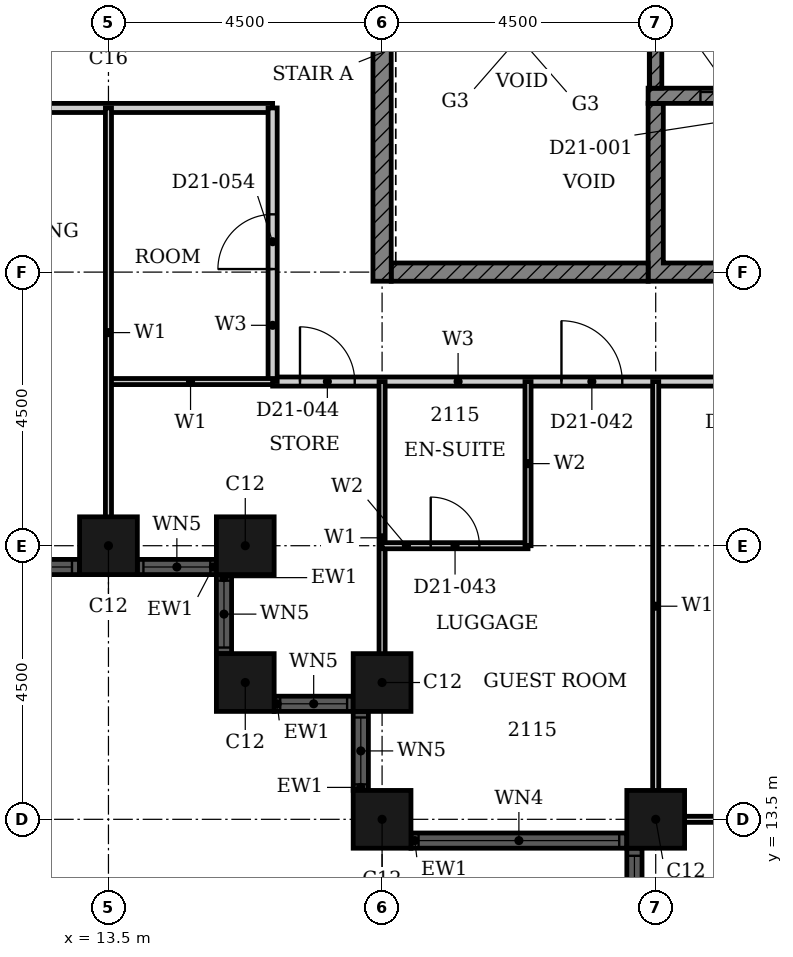
"""IFC4 building model, lengths in metres.
Left out: names, types, materials, properties, quantities, classifications, styles, units other than length and angle.
Written with IfcOpenShell. Run it as: python <this file> out.ifc"""

import sys

from ifc_helpers import new_model, si_unit, direction, frame, frame_2d, origin, origin_2d, place, context, subcontext, project, spatial, polyline, rectangle, hollow_rectangle, outline, extrude, element, fill, save


model = new_model("IFC4")
c1 = context("Model", 3, precision=1e-05, world=origin(), true_north=direction((0.0, 1.0)))
c2 = subcontext(c1, "Body", "Model", "MODEL_VIEW")
j1 = project(units=[si_unit("LENGTHUNIT", "METRE"), si_unit("PLANEANGLEUNIT", "RADIAN")], contexts=[c1])
p1 = place(None, origin())
s1 = spatial("IfcSite", under=j1, at=p1, CompositionType="ELEMENT")
p2 = place(p1, origin())
s2 = spatial("IfcBuilding", under=s1, at=p2, CompositionType="ELEMENT")
p3 = place(p2, frame((0.0, 0.0, 88.8)))
s3 = spatial("IfcBuildingStorey", under=s2, at=p3, CompositionType="ELEMENT", Elevation=88.8)
for number, where, z_axis, x_axis in (
    (1, (13.5, 18.0, 0.0), (0.0, 0.0, 1.0), (1.0, 0.0, 0.0)),
    (2, (15.75, 18.0, 0.0), (0.0, 0.0, 1.0), (1.0, 0.0, 0.0)),
    (3, (15.75, 15.75, 0.0), (0.0, 0.0, 1.0), (1.0, 0.0, 0.0)),
    (4, (18.0, 15.75, 0.0), (0.0, 0.0, 1.0), (1.0, 0.0, 0.0)),
    (5, (18.0, 13.5, 0.0), (0.0, 0.0, 1.0), (1.0, 0.0, 0.0)),
    (6, (22.5, 13.5, 0.0), (0.0, 0.0, 1.0), (1.0, 0.0, 0.0)),
):
    element("IfcColumn", number, at=place(p3, frame(where, z_axis=z_axis, x_axis=x_axis)), inside=s3, PredefinedType="COLUMN", context=c2, shape_type="SweptSolid", body=[
        extrude(hollow_rectangle(XDim=0.95, YDim=0.95, WallThickness=0.03, at=origin_2d()), origin(), (0.0, 0.0, 1.0), 3.6),
    ])
p4 = place(p3, frame((4.975, 17.65, 0.0), z_axis=(0.0, 0.0, 1.0), x_axis=(1.0, 0.0, 0.0)))
e7 = element("IfcWall", 7, at=p4, inside=s3, PredefinedType="SOLIDWALL", context=c2, shape_type="SweptSolid", body=[
    extrude(rectangle(XDim=8.05, YDim=0.25, at=frame_2d((4.025, 0.0))), origin(), (0.0, 0.0, 1.0), 3.6),
])
p5 = place(p4, frame((0.125, 0.0, 0.9)))
e8 = element("IfcOpeningElement", 8, at=p5, cuts=e7, PredefinedType="OPENING", context=c2, shape_type="SweptSolid", body=[
    extrude(rectangle(XDim=3.3, YDim=2.08, at=frame_2d((1.65, 1.04))), frame((0.0, 0.135, 0.0), z_axis=(0.0, -1.0, 0.0), x_axis=(1.0, 0.0, 0.0)), (0.0, 0.0, 1.0), 0.27),
])
p6 = place(p4, frame((4.625, 0.0, 0.9)))
e9 = element("IfcOpeningElement", 9, at=p6, cuts=e7, PredefinedType="OPENING", context=c2, shape_type="SweptSolid", body=[
    extrude(rectangle(XDim=3.3, YDim=2.08, at=frame_2d((1.65, 1.04))), frame((0.0, 0.135, 0.0), z_axis=(0.0, -1.0, 0.0), x_axis=(1.0, 0.0, 0.0)), (0.0, 0.0, 1.0), 0.27),
])
p7 = place(p3, frame((13.975, 17.65, 0.0), z_axis=(0.0, 0.0, 1.0), x_axis=(1.0, 0.0, 0.0)))
e10 = element("IfcWall", 10, at=p7, inside=s3, PredefinedType="SOLIDWALL", context=c2, shape_type="SweptSolid", body=[
    extrude(rectangle(XDim=1.3, YDim=0.25, at=frame_2d((0.65, 0.0))), origin(), (0.0, 0.0, 1.0), 3.6),
])
p8 = place(p7, frame((0.1, 0.0, 0.9)))
e11 = element("IfcOpeningElement", 11, at=p8, cuts=e10, PredefinedType="OPENING", context=c2, shape_type="SweptSolid", body=[
    extrude(rectangle(XDim=1.1, YDim=2.08, at=frame_2d((0.55, 1.04))), frame((0.0, 0.135, 0.0), z_axis=(0.0, -1.0, 0.0), x_axis=(1.0, 0.0, 0.0)), (0.0, 0.0, 1.0), 0.27),
])
p9 = place(p3, frame((15.4, 17.525, 0.0), z_axis=(0.0, 0.0, 1.0), x_axis=(0.0, -1.0, 0.0)))
e12 = element("IfcWall", 12, at=p9, inside=s3, PredefinedType="SOLIDWALL", context=c2, shape_type="SweptSolid", body=[
    extrude(rectangle(XDim=1.3, YDim=0.25, at=frame_2d((0.65, 0.0))), origin(), (0.0, 0.0, 1.0), 3.6),
])
p10 = place(p9, frame((0.1, 0.0, 0.9)))
e13 = element("IfcOpeningElement", 13, at=p10, cuts=e12, PredefinedType="OPENING", context=c2, shape_type="SweptSolid", body=[
    extrude(rectangle(XDim=1.1, YDim=2.08, at=frame_2d((0.55, 1.04))), frame((0.0, 0.135, 0.0), z_axis=(0.0, -1.0, 0.0), x_axis=(1.0, 0.0, 0.0)), (0.0, 0.0, 1.0), 0.27),
])
p11 = place(p3, frame((16.225, 15.4, 0.0), z_axis=(0.0, 0.0, 1.0), x_axis=(1.0, 0.0, 0.0)))
e14 = element("IfcWall", 14, at=p11, inside=s3, PredefinedType="SOLIDWALL", context=c2, shape_type="SweptSolid", body=[
    extrude(rectangle(XDim=1.3, YDim=0.25, at=frame_2d((0.65, 0.0))), origin(), (0.0, 0.0, 1.0), 3.6),
])
p12 = place(p11, frame((0.1, 0.0, 0.9)))
e15 = element("IfcOpeningElement", 15, at=p12, cuts=e14, PredefinedType="OPENING", context=c2, shape_type="SweptSolid", body=[
    extrude(rectangle(XDim=1.1, YDim=2.08, at=frame_2d((0.55, 1.04))), frame((0.0, 0.135, 0.0), z_axis=(0.0, -1.0, 0.0), x_axis=(1.0, 0.0, 0.0)), (0.0, 0.0, 1.0), 0.27),
])
p13 = place(p3, frame((17.65, 15.275, 0.0), z_axis=(0.0, 0.0, 1.0), x_axis=(0.0, -1.0, 0.0)))
e16 = element("IfcWall", 16, at=p13, inside=s3, PredefinedType="SOLIDWALL", context=c2, shape_type="SweptSolid", body=[
    extrude(rectangle(XDim=1.3, YDim=0.25, at=frame_2d((0.65, 0.0))), origin(), (0.0, 0.0, 1.0), 3.6),
])
p14 = place(p13, frame((0.1, 0.0, 0.9)))
e17 = element("IfcOpeningElement", 17, at=p14, cuts=e16, PredefinedType="OPENING", context=c2, shape_type="SweptSolid", body=[
    extrude(rectangle(XDim=1.1, YDim=2.08, at=frame_2d((0.55, 1.04))), frame((0.0, 0.135, 0.0), z_axis=(0.0, -1.0, 0.0), x_axis=(1.0, 0.0, 0.0)), (0.0, 0.0, 1.0), 0.27),
])
p15 = place(p3, frame((18.475, 13.15, 0.0), z_axis=(0.0, 0.0, 1.0), x_axis=(1.0, 0.0, 0.0)))
e18 = element("IfcWall", 18, at=p15, inside=s3, PredefinedType="SOLIDWALL", context=c2, shape_type="SweptSolid", body=[
    extrude(rectangle(XDim=3.55, YDim=0.25, at=frame_2d((1.775, 0.0))), origin(), (0.0, 0.0, 1.0), 3.6),
])
p16 = place(p15, frame((0.125, 0.0, 0.9)))
e19 = element("IfcOpeningElement", 19, at=p16, cuts=e18, PredefinedType="OPENING", context=c2, shape_type="SweptSolid", body=[
    extrude(rectangle(XDim=3.3, YDim=2.08, at=frame_2d((1.65, 1.04))), frame((0.0, 0.135, 0.0), z_axis=(0.0, -1.0, 0.0), x_axis=(1.0, 0.0, 0.0)), (0.0, 0.0, 1.0), 0.27),
])
p17 = place(p3, frame((22.15, 13.025, 0.0), z_axis=(0.0, 0.0, 1.0), x_axis=(0.0, -1.0, 0.0)))
e20 = element("IfcWall", 20, at=p17, inside=s3, PredefinedType="SOLIDWALL", context=c2, shape_type="SweptSolid", body=[
    extrude(rectangle(XDim=8.05, YDim=0.25, at=frame_2d((4.025, 0.0))), origin(), (0.0, 0.0, 1.0), 3.6),
])
p18 = place(p17, frame((0.125, 0.0, 0.9)))
e21 = element("IfcOpeningElement", 21, at=p18, cuts=e20, PredefinedType="OPENING", context=c2, shape_type="SweptSolid", body=[
    extrude(rectangle(XDim=3.3, YDim=2.08, at=frame_2d((1.65, 1.04))), frame((0.0, 0.135, 0.0), z_axis=(0.0, -1.0, 0.0), x_axis=(1.0, 0.0, 0.0)), (0.0, 0.0, 1.0), 0.27),
])
p19 = place(p17, frame((4.625, 0.0, 0.9)))
e22 = element("IfcOpeningElement", 22, at=p19, cuts=e20, PredefinedType="OPENING", context=c2, shape_type="SweptSolid", body=[
    extrude(rectangle(XDim=3.3, YDim=2.08, at=frame_2d((1.65, 1.04))), frame((0.0, 0.135, 0.0), z_axis=(0.0, -1.0, 0.0), x_axis=(1.0, 0.0, 0.0)), (0.0, 0.0, 1.0), 0.27),
])
p20 = place(p3, origin())
e23 = element("IfcWall", 23, at=p20, inside=s3, PredefinedType="SHEAR", context=c2, shape_type="SweptSolid", body=[
    extrude(outline(polyline([(22.375, 22.35), (38.053, 22.35), (38.053, 25.275), (37.803, 25.275), (37.803, 22.65), (35.482, 22.65), (35.482, 25.275), (35.232, 25.275), (35.232, 22.65), (32.911, 22.65), (32.911, 25.275), (32.661, 25.275), (32.661, 22.65), (30.339, 22.65), (30.339, 25.275), (30.089, 25.275), (30.089, 22.65), (27.768, 22.65), (27.768, 25.275), (27.518, 25.275), (27.518, 22.65), (25.197, 22.65), (25.197, 25.275), (24.947, 25.275), (24.947, 22.65), (22.625, 22.65), (22.625, 25.275), (22.375, 25.275), (22.375, 22.35)])), origin(), (0.0, 0.0, 1.0), 3.3),
])
p21 = place(p3, frame((18.15, 22.5, 0.0), z_axis=(0.0, 0.0, 1.0), x_axis=(1.0, 0.0, 0.0)))
e24 = element("IfcWall", 24, at=p21, inside=s3, PredefinedType="SHEAR", context=c2, shape_type="SweptSolid", body=[
    extrude(rectangle(XDim=4.225, YDim=0.3, at=frame_2d((2.113, 0.0))), origin(), (0.0, 0.0, 1.0), 3.3),
])
p22 = place(p3, frame((18.0, 22.35, 0.0), z_axis=(0.0, 0.0, 1.0), x_axis=(0.0, 1.0, 0.0)))
e25 = element("IfcWall", 25, at=p22, inside=s3, PredefinedType="SHEAR", context=c2, shape_type="SweptSolid", body=[
    extrude(rectangle(XDim=9.3, YDim=0.3, at=frame_2d((4.65, 0.0))), origin(), (0.0, 0.0, 1.0), 3.3),
])
p23 = place(p3, frame((22.375, 25.4, 0.0), z_axis=(0.0, 0.0, 1.0), x_axis=(1.0, 0.0, 0.0)))
e26 = element("IfcWall", 26, at=p23, inside=s3, PredefinedType="SHEAR", context=c2, shape_type="SweptSolid", body=[
    extrude(rectangle(XDim=15.678, YDim=0.25, at=frame_2d((7.839, 0.0))), origin(), (0.0, 0.0, 1.0), 3.3),
])
p24 = place(p23, frame((3.432, 0.0, 0.0)))
e27 = element("IfcOpeningElement", 27, at=p24, cuts=e26, PredefinedType="OPENING", context=c2, shape_type="SweptSolid", body=[
    extrude(rectangle(XDim=1.1, YDim=2.1, at=frame_2d((0.55, 1.05))), frame((0.0, 0.135, 0.0), z_axis=(0.0, -1.0, 0.0), x_axis=(1.0, 0.0, 0.0)), (0.0, 0.0, 1.0), 0.27),
])
p25 = place(p23, frame((11.146, 0.0, 0.0)))
e28 = element("IfcOpeningElement", 28, at=p25, cuts=e26, PredefinedType="OPENING", context=c2, shape_type="SweptSolid", body=[
    extrude(rectangle(XDim=1.1, YDim=2.1, at=frame_2d((0.55, 1.05))), frame((0.0, 0.135, 0.0), z_axis=(0.0, -1.0, 0.0), x_axis=(1.0, 0.0, 0.0)), (0.0, 0.0, 1.0), 0.27),
])
p26 = place(p23, frame((13.718, 0.0, 0.0)))
e29 = element("IfcOpeningElement", 29, at=p26, cuts=e26, PredefinedType="OPENING", context=c2, shape_type="SweptSolid", body=[
    extrude(rectangle(XDim=1.1, YDim=2.1, at=frame_2d((0.55, 1.05))), frame((0.0, 0.135, 0.0), z_axis=(0.0, -1.0, 0.0), x_axis=(1.0, 0.0, 0.0)), (0.0, 0.0, 1.0), 0.27),
])
p27 = place(p23, frame((0.861, 0.0, 0.0)))
e30 = element("IfcOpeningElement", 30, at=p27, cuts=e26, PredefinedType="OPENING", context=c2, shape_type="SweptSolid", body=[
    extrude(rectangle(XDim=1.1, YDim=2.1, at=frame_2d((0.55, 1.05))), frame((0.0, 0.135, 0.0), z_axis=(0.0, -1.0, 0.0), x_axis=(1.0, 0.0, 0.0)), (0.0, 0.0, 1.0), 0.27),
])
p28 = place(p3, frame((22.5, 31.35, 0.0), z_axis=(0.0, 0.0, 1.0), x_axis=(0.0, -1.0, 0.0)))
e31 = element("IfcWall", 31, at=p28, inside=s3, PredefinedType="SHEAR", context=c2, shape_type="SweptSolid", body=[
    extrude(rectangle(XDim=5.825, YDim=0.2, at=frame_2d((2.913, 0.0))), origin(), (0.0, 0.0, 1.0), 3.3),
])
p29 = place(p28, frame((0.25, 0.0, 0.0)))
e32 = element("IfcOpeningElement", 32, at=p29, cuts=e31, PredefinedType="OPENING", context=c2, shape_type="SweptSolid", body=[
    extrude(rectangle(XDim=1.8, YDim=2.1, at=frame_2d((0.9, 1.05))), frame((0.0, 0.11, 0.0), z_axis=(0.0, -1.0, 0.0), x_axis=(1.0, 0.0, 0.0)), (0.0, 0.0, 1.0), 0.22),
])
p30 = place(p3, frame((16.2, 20.7, 0.0), z_axis=(0.0, 0.0, 1.0), x_axis=(1.0, 0.0, 0.0)))
e33 = element("IfcWall", 33, at=p30, inside=s3, PredefinedType="PARTITIONING", context=c2, shape_type="SweptSolid", body=[
    extrude(rectangle(XDim=13.5, YDim=0.15, at=frame_2d((6.75, 0.0))), origin(), (0.0, 0.0, 1.0), 3.3),
])
p31 = place(p30, frame((4.75, 0.0, 0.0)))
e34 = element("IfcOpeningElement", 34, at=p31, cuts=e33, PredefinedType="OPENING", context=c2, shape_type="SweptSolid", body=[
    extrude(rectangle(XDim=1.0, YDim=2.1, at=frame_2d((0.5, 1.05))), frame((0.0, 0.085, 0.0), z_axis=(0.0, -1.0, 0.0), x_axis=(1.0, 0.0, 0.0)), (0.0, 0.0, 1.0), 0.17),
])
p32 = place(p30, frame((0.45, 0.0, 0.0)))
e35 = element("IfcOpeningElement", 35, at=p32, cuts=e33, PredefinedType="OPENING", context=c2, shape_type="SweptSolid", body=[
    extrude(rectangle(XDim=0.9, YDim=2.1, at=frame_2d((0.45, 1.05))), frame((0.0, 0.085, 0.0), z_axis=(0.0, -1.0, 0.0), x_axis=(1.0, 0.0, 0.0)), (0.0, 0.0, 1.0), 0.17),
])
p33 = place(p30, frame((7.35, 0.0, 0.0)))
e36 = element("IfcOpeningElement", 36, at=p33, cuts=e33, PredefinedType="OPENING", context=c2, shape_type="SweptSolid", body=[
    extrude(rectangle(XDim=0.9, YDim=2.1, at=frame_2d((0.45, 1.05))), frame((0.0, 0.085, 0.0), z_axis=(0.0, -1.0, 0.0), x_axis=(1.0, 0.0, 0.0)), (0.0, 0.0, 1.0), 0.17),
])
p34 = place(p30, frame((10.95, 0.0, 0.0)))
e37 = element("IfcOpeningElement", 37, at=p34, cuts=e33, PredefinedType="OPENING", context=c2, shape_type="SweptSolid", body=[
    extrude(rectangle(XDim=0.9, YDim=2.1, at=frame_2d((0.45, 1.05))), frame((0.0, 0.085, 0.0), z_axis=(0.0, -1.0, 0.0), x_axis=(1.0, 0.0, 0.0)), (0.0, 0.0, 1.0), 0.17),
])
p35 = place(p3, frame((4.5, 25.2, 0.0), z_axis=(0.0, 0.0, 1.0), x_axis=(1.0, 0.0, 0.0)))
e38 = element("IfcWall", 38, at=p35, inside=s3, PredefinedType="PARTITIONING", context=c2, shape_type="SweptSolid", body=[
    extrude(rectangle(XDim=11.7, YDim=0.15, at=frame_2d((5.85, 0.0))), origin(), (0.0, 0.0, 1.0), 3.3),
])
p36 = place(p35, frame((6.25, 0.0, 0.0)))
e39 = element("IfcOpeningElement", 39, at=p36, cuts=e38, PredefinedType="OPENING", context=c2, shape_type="SweptSolid", body=[
    extrude(rectangle(XDim=1.0, YDim=2.1, at=frame_2d((0.5, 1.05))), frame((0.0, 0.085, 0.0), z_axis=(0.0, -1.0, 0.0), x_axis=(1.0, 0.0, 0.0)), (0.0, 0.0, 1.0), 0.17),
])
p37 = place(p3, frame((16.2, 20.7, 0.0), z_axis=(0.0, 0.0, 1.0), x_axis=(0.0, 1.0, 0.0)))
e40 = element("IfcWall", 40, at=p37, inside=s3, PredefinedType="PARTITIONING", context=c2, shape_type="SweptSolid", body=[
    extrude(rectangle(XDim=4.5, YDim=0.15, at=frame_2d((2.25, 0.0))), origin(), (0.0, 0.0, 1.0), 3.3),
])
p38 = place(p37, frame((1.85, 0.0, 0.0)))
e41 = element("IfcOpeningElement", 41, at=p38, cuts=e40, PredefinedType="OPENING", context=c2, shape_type="SweptSolid", body=[
    extrude(rectangle(XDim=0.9, YDim=2.1, at=frame_2d((0.45, 1.05))), frame((0.0, 0.085, 0.0), z_axis=(0.0, -1.0, 0.0), x_axis=(1.0, 0.0, 0.0)), (0.0, 0.0, 1.0), 0.17),
])
p39 = place(p3, frame((22.31, 13.5, 0.0), z_axis=(0.0, 0.0, 1.0), x_axis=(1.0, 0.0, 0.0)))
e42 = element("IfcWall", 42, at=p39, inside=s3, PredefinedType="PARTITIONING", context=c2, shape_type="SweptSolid", body=[
    extrude(rectangle(XDim=7.39, YDim=0.1, at=frame_2d((3.695, 0.0))), origin(), (0.0, 0.0, 1.0), 2.38),
])
p40 = place(p3, frame((13.5, 20.7, 0.0), z_axis=(0.0, 0.0, 1.0), x_axis=(1.0, 0.0, 0.0)))
e43 = element("IfcWall", 43, at=p40, inside=s3, PredefinedType="PARTITIONING", context=c2, shape_type="SweptSolid", body=[
    extrude(rectangle(XDim=2.7, YDim=0.1, at=frame_2d((1.35, 0.0))), origin(), (0.0, 0.0, 1.0), 3.3),
])
p41 = place(p3, frame((13.5, 17.81, 0.0), z_axis=(0.0, 0.0, 1.0), x_axis=(0.0, 1.0, 0.0)))
e44 = element("IfcWall", 44, at=p41, inside=s3, PredefinedType="PARTITIONING", context=c2, shape_type="SweptSolid", body=[
    extrude(rectangle(XDim=7.39, YDim=0.1, at=frame_2d((3.695, 0.0))), origin(), (0.0, 0.0, 1.0), 2.38),
])
p42 = place(p3, frame((18.0, 15.56, 0.0), z_axis=(0.0, 0.0, 1.0), x_axis=(0.0, 1.0, 0.0)))
e45 = element("IfcWall", 45, at=p42, inside=s3, PredefinedType="PARTITIONING", context=c2, shape_type="SweptSolid", body=[
    extrude(rectangle(XDim=5.14, YDim=0.1, at=frame_2d((2.57, 0.0))), origin(), (0.0, 0.0, 1.0), 3.3),
])
p43 = place(p3, frame((22.5, 13.31, 0.0), z_axis=(0.0, 0.0, 1.0), x_axis=(0.0, 1.0, 0.0)))
e46 = element("IfcWall", 46, at=p43, inside=s3, PredefinedType="PARTITIONING", context=c2, shape_type="SweptSolid", body=[
    extrude(rectangle(XDim=7.39, YDim=0.1, at=frame_2d((3.695, 0.0))), origin(), (0.0, 0.0, 1.0), 3.3),
])
p44 = place(p3, frame((18.0, 18.0, 0.0), z_axis=(0.0, 0.0, 1.0), x_axis=(1.0, 0.0, 0.0)))
e47 = element("IfcWall", 47, at=p44, inside=s3, PredefinedType="PARTITIONING", context=c2, shape_type="SweptSolid", body=[
    extrude(rectangle(XDim=2.4, YDim=0.1, at=frame_2d((1.2, 0.0))), origin(), (0.0, 0.0, 1.0), 3.3),
])
p45 = place(p44, frame((0.8, 0.0, 0.0)))
e48 = element("IfcOpeningElement", 48, at=p45, cuts=e47, PredefinedType="OPENING", context=c2, shape_type="SweptSolid", body=[
    extrude(rectangle(XDim=0.8, YDim=2.1, at=frame_2d((0.4, 1.05))), frame((0.0, 0.06, 0.0), z_axis=(0.0, -1.0, 0.0), x_axis=(1.0, 0.0, 0.0)), (0.0, 0.0, 1.0), 0.12),
])
p46 = place(p3, frame((20.4, 18.0, 0.0), z_axis=(0.0, 0.0, 1.0), x_axis=(0.0, 1.0, 0.0)))
e49 = element("IfcWall", 49, at=p46, inside=s3, PredefinedType="PARTITIONING", context=c2, shape_type="SweptSolid", body=[
    extrude(rectangle(XDim=2.7, YDim=0.1, at=frame_2d((1.35, 0.0))), origin(), (0.0, 0.0, 1.0), 3.3),
])
p47 = place(p6, origin())
e50 = element("IfcWindow", 50, at=p47, inside=s3, PartitioningType="SINGLE_PANEL", PredefinedType="WINDOW", context=c2, shape_type="SweptSolid", body=[
    extrude(rectangle(XDim=3.3, YDim=2.08, at=frame_2d((1.65, 1.04))), frame((0.0, 0.03, 0.0), z_axis=(0.0, -1.0, 0.0), x_axis=(1.0, 0.0, 0.0)), (0.0, 0.0, 1.0), 0.06),
])
fill(e9, e50)
p48 = place(p8, origin())
e51 = element("IfcWindow", 51, at=p48, inside=s3, PartitioningType="SINGLE_PANEL", PredefinedType="WINDOW", context=c2, shape_type="SweptSolid", body=[
    extrude(rectangle(XDim=1.1, YDim=2.08, at=frame_2d((0.55, 1.04))), frame((0.0, 0.03, 0.0), z_axis=(0.0, -1.0, 0.0), x_axis=(1.0, 0.0, 0.0)), (0.0, 0.0, 1.0), 0.06),
])
fill(e11, e51)
p49 = place(p10, origin())
e52 = element("IfcWindow", 52, at=p49, inside=s3, PartitioningType="SINGLE_PANEL", PredefinedType="WINDOW", context=c2, shape_type="SweptSolid", body=[
    extrude(rectangle(XDim=1.1, YDim=2.08, at=frame_2d((0.55, 1.04))), frame((0.0, 0.03, 0.0), z_axis=(0.0, -1.0, 0.0), x_axis=(1.0, 0.0, 0.0)), (0.0, 0.0, 1.0), 0.06),
])
fill(e13, e52)
p50 = place(p12, origin())
e53 = element("IfcWindow", 53, at=p50, inside=s3, PartitioningType="SINGLE_PANEL", PredefinedType="WINDOW", context=c2, shape_type="SweptSolid", body=[
    extrude(rectangle(XDim=1.1, YDim=2.08, at=frame_2d((0.55, 1.04))), frame((0.0, 0.03, 0.0), z_axis=(0.0, -1.0, 0.0), x_axis=(1.0, 0.0, 0.0)), (0.0, 0.0, 1.0), 0.06),
])
fill(e15, e53)
p51 = place(p14, origin())
e54 = element("IfcWindow", 54, at=p51, inside=s3, PartitioningType="SINGLE_PANEL", PredefinedType="WINDOW", context=c2, shape_type="SweptSolid", body=[
    extrude(rectangle(XDim=1.1, YDim=2.08, at=frame_2d((0.55, 1.04))), frame((0.0, 0.03, 0.0), z_axis=(0.0, -1.0, 0.0), x_axis=(1.0, 0.0, 0.0)), (0.0, 0.0, 1.0), 0.06),
])
fill(e17, e54)
p52 = place(p16, origin())
e55 = element("IfcWindow", 55, at=p52, inside=s3, PartitioningType="SINGLE_PANEL", PredefinedType="WINDOW", context=c2, shape_type="SweptSolid", body=[
    extrude(rectangle(XDim=3.3, YDim=2.08, at=frame_2d((1.65, 1.04))), frame((0.0, 0.03, 0.0), z_axis=(0.0, -1.0, 0.0), x_axis=(1.0, 0.0, 0.0)), (0.0, 0.0, 1.0), 0.06),
])
fill(e19, e55)
p53 = place(p18, origin())
e56 = element("IfcWindow", 56, at=p53, inside=s3, PartitioningType="SINGLE_PANEL", PredefinedType="WINDOW", context=c2, shape_type="SweptSolid", body=[
    extrude(rectangle(XDim=3.3, YDim=2.08, at=frame_2d((1.65, 1.04))), frame((0.0, 0.03, 0.0), z_axis=(0.0, -1.0, 0.0), x_axis=(1.0, 0.0, 0.0)), (0.0, 0.0, 1.0), 0.06),
])
fill(e21, e56)
p54 = place(p27, origin())
e57 = element("IfcDoor", 57, at=p54, inside=s3, OperationType="DOUBLE_DOOR_SLIDING", PredefinedType="DOOR", context=c2, shape_type="SweptSolid", body=[
    extrude(rectangle(XDim=1.1, YDim=2.1, at=frame_2d((0.55, 1.05))), frame((0.0, 0.025, 0.0), z_axis=(0.0, -1.0, 0.0), x_axis=(1.0, 0.0, 0.0)), (0.0, 0.0, 1.0), 0.05),
])
fill(e30, e57)
p55 = place(p31, origin())
e58 = element("IfcDoor", 58, at=p55, inside=s3, OperationType="SINGLE_SWING_RIGHT", PredefinedType="DOOR", context=c2, shape_type="SweptSolid", body=[
    extrude(rectangle(XDim=1.0, YDim=2.1, at=frame_2d((0.5, 1.05))), frame((0.0, 0.025, 0.0), z_axis=(0.0, -1.0, 0.0), x_axis=(1.0, 0.0, 0.0)), (0.0, 0.0, 1.0), 0.05),
])
fill(e34, e58)
p56 = place(p45, origin())
e59 = element("IfcDoor", 59, at=p56, inside=s3, OperationType="SINGLE_SWING_RIGHT", PredefinedType="DOOR", context=c2, shape_type="SweptSolid", body=[
    extrude(rectangle(XDim=0.8, YDim=2.1, at=frame_2d((0.4, 1.05))), frame((0.0, 0.025, 0.0), z_axis=(0.0, -1.0, 0.0), x_axis=(1.0, 0.0, 0.0)), (0.0, 0.0, 1.0), 0.05),
])
fill(e48, e59)
p57 = place(p32, origin())
e60 = element("IfcDoor", 60, at=p57, inside=s3, OperationType="SINGLE_SWING_LEFT", PredefinedType="DOOR", context=c2, shape_type="SweptSolid", body=[
    extrude(rectangle(XDim=0.9, YDim=2.1, at=frame_2d((0.45, 1.05))), frame((0.0, 0.025, 0.0), z_axis=(0.0, -1.0, 0.0), x_axis=(1.0, 0.0, 0.0)), (0.0, 0.0, 1.0), 0.05),
])
fill(e35, e60)
p58 = place(p38, origin())
e61 = element("IfcDoor", 61, at=p58, inside=s3, OperationType="SINGLE_SWING_LEFT", PredefinedType="DOOR", context=c2, shape_type="SweptSolid", body=[
    extrude(rectangle(XDim=0.9, YDim=2.1, at=frame_2d((0.45, 1.05))), frame((0.0, 0.025, 0.0), z_axis=(0.0, -1.0, 0.0), x_axis=(1.0, 0.0, 0.0)), (0.0, 0.0, 1.0), 0.05),
])
fill(e41, e61)
save(model, sys.argv[1])
